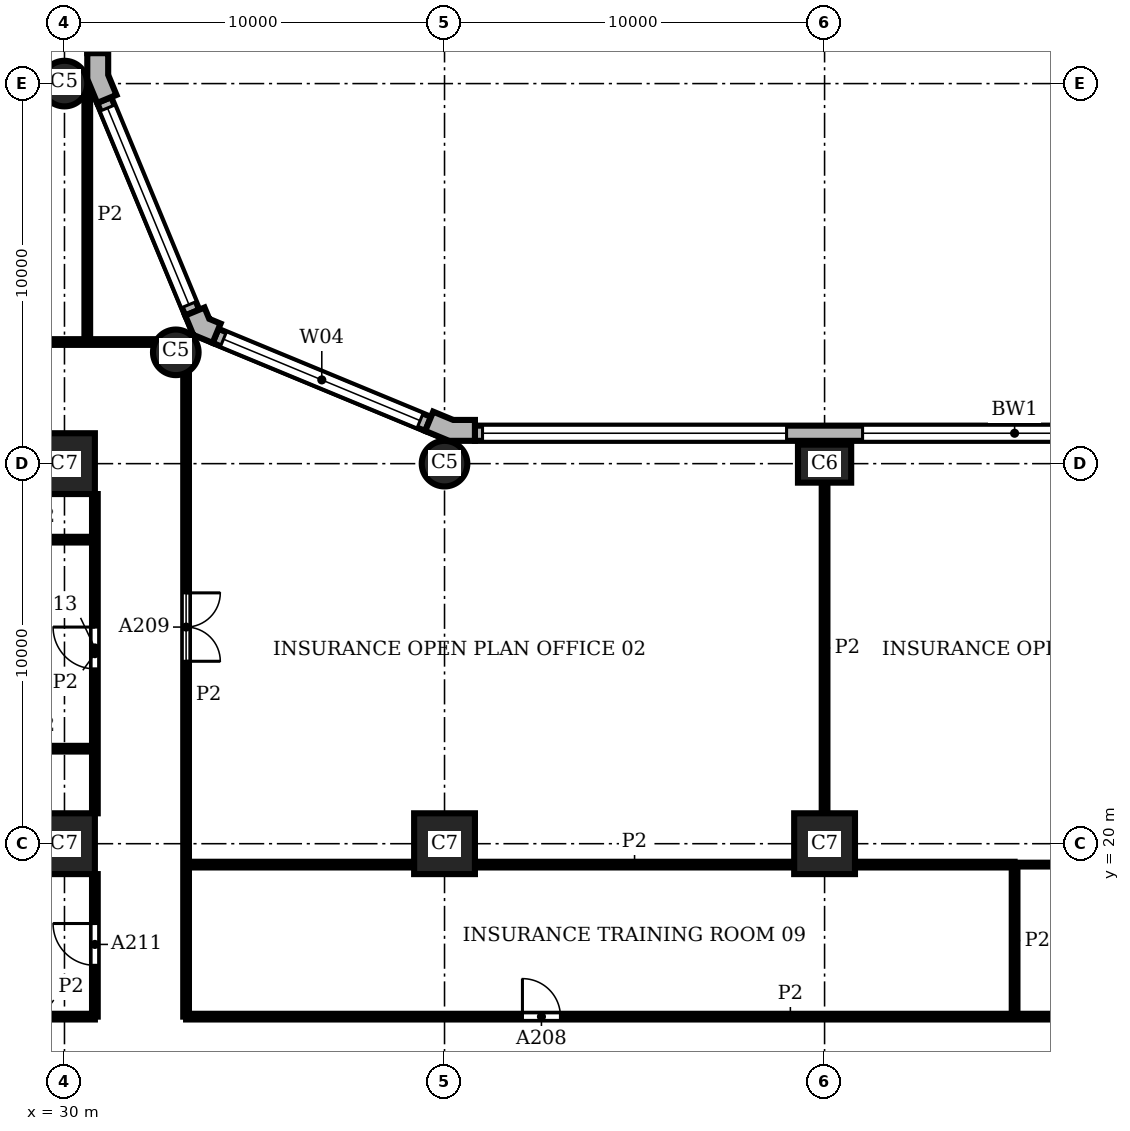
"""IFC4 building model, lengths in metres.
Left out: names, types, materials, properties, quantities, classifications, styles, units other than length and angle.
Written with IfcOpenShell. Run it as: python <this file> out.ifc"""

import sys

from ifc_helpers import new_model, si_unit, direction, frame, frame_2d, origin, origin_2d, place, context, subcontext, project, spatial, polyline, rectangle, circle, outline, extrude, element, fill, save


model = new_model("IFC4")
c1 = context("Model", 3, precision=1e-05, world=origin(), true_north=direction((0.0, 1.0)))
c2 = subcontext(c1, "Body", "Model", "MODEL_VIEW")
j1 = project(units=[si_unit("LENGTHUNIT", "METRE"), si_unit("PLANEANGLEUNIT", "RADIAN")], contexts=[c1])
p1 = place(None, origin())
s1 = spatial("IfcSite", under=j1, at=p1, CompositionType="ELEMENT")
p2 = place(p1, origin())
s2 = spatial("IfcBuilding", under=s1, at=p2, CompositionType="ELEMENT")
p3 = place(p2, frame((0.0, 0.0, 23.7)))
s3 = spatial("IfcBuildingStorey", under=s2, at=p3, CompositionType="ELEMENT", Elevation=23.7)
p4 = place(p3, frame((50.0, 30.0, 0.0), z_axis=(0.0, 0.0, 1.0), x_axis=(1.0, 0.0, 0.0)))
e1 = element("IfcColumn", 1, at=p4, inside=s3, PredefinedType="COLUMN", context=c2, shape_type="SweptSolid", body=[
    extrude(rectangle(XDim=1.4, YDim=1.0, at=origin_2d()), origin(), (0.0, 0.0, 1.0), 3.9),
])
for number, where, z_axis, x_axis in (
    (2, (40.0, 30.0, 0.0), (0.0, 0.0, 1.0), (1.0, 0.0, 0.0)),
    (3, (32.929, 32.929, 0.0), (0.0, 0.0, 1.0), (1.0, 0.0, 0.0)),
    (4, (30.0, 40.0, 0.0), (0.0, 0.0, 1.0), (1.0, 0.0, 0.0)),
):
    element("IfcColumn", number, at=place(p3, frame(where, z_axis=z_axis, x_axis=x_axis)), inside=s3, PredefinedType="COLUMN", context=c2, shape_type="SweptSolid", body=[
        extrude(circle(Radius=0.6, at=origin_2d()), origin(), (0.0, 0.0, 1.0), 3.9),
    ])
for number, where, z_axis, x_axis in (
    (5, (30.0, 20.0, 0.0), (0.0, 0.0, 1.0), (1.0, 0.0, 0.0)),
    (6, (30.0, 30.0, 0.0), (0.0, 0.0, 1.0), (1.0, 0.0, 0.0)),
    (7, (40.0, 20.0, 0.0), (0.0, 0.0, 1.0), (1.0, 0.0, 0.0)),
    (8, (50.0, 20.0, 0.0), (0.0, 0.0, 1.0), (1.0, 0.0, 0.0)),
):
    element("IfcColumn", number, at=place(p3, frame(where, z_axis=z_axis, x_axis=x_axis)), inside=s3, PredefinedType="COLUMN", context=c2, shape_type="SweptSolid", body=[
        extrude(rectangle(XDim=1.6, YDim=1.6, at=origin_2d()), origin(), (0.0, 0.0, 1.0), 3.9),
    ])
p5 = place(p3, origin())
e9 = element("IfcWall", 9, at=p5, inside=s3, PredefinedType="SOLIDWALL", context=c2, shape_type="SweptSolid", body=[
    extrude(outline(polyline([(40.8, 31.0), (40.8, 31.15), (40.229, 31.15), (39.701, 31.369), (39.644, 31.23), (39.49, 30.861), (40.119, 30.6), (40.8, 30.6), (40.8, 31.0)])), origin(), (0.0, 0.0, 1.0), 3.9),
])
e10 = element("IfcWall", 10, at=p5, inside=s3, PredefinedType="SOLIDWALL", context=c2, shape_type="SweptSolid", body=[
    extrude(outline(polyline([(34.051, 33.547), (34.108, 33.685), (33.809, 33.809), (33.685, 34.108), (33.547, 34.051), (33.177, 33.898), (33.388, 33.388), (33.898, 33.177), (34.051, 33.547)])), origin(), (0.0, 0.0, 1.0), 3.9),
])
e11 = element("IfcWall", 11, at=p5, inside=s3, PredefinedType="SOLIDWALL", context=c2, shape_type="SweptSolid", body=[
    extrude(outline(polyline([(31.23, 39.644), (31.369, 39.701), (31.15, 40.229), (31.15, 40.8), (31.0, 40.8), (30.6, 40.8), (30.6, 40.119), (30.861, 39.49), (31.23, 39.644)])), origin(), (0.0, 0.0, 1.0), 3.9),
])
p6 = place(p3, frame((69.2, 30.8, 0.0), z_axis=(0.0, 0.0, 1.0), x_axis=(-1.0, 0.0, 0.0)))
e12 = element("IfcWall", 12, at=p6, inside=s3, PredefinedType="SOLIDWALL", context=c2, shape_type="SweptSolid", body=[
    extrude(rectangle(XDim=28.4, YDim=0.4, at=frame_2d((14.2, 0.0))), origin(), (0.0, 0.0, 1.0), 3.9),
])
p7 = place(p6, frame((0.2, 0.0, 0.9)))
e13 = element("IfcOpeningElement", 13, at=p7, cuts=e12, PredefinedType="OPENING", context=c2, shape_type="SweptSolid", body=[
    extrude(rectangle(XDim=8.0, YDim=2.35, at=frame_2d((4.0, 1.175))), frame((0.0, 0.21, 0.0), z_axis=(0.0, -1.0, 0.0), x_axis=(1.0, 0.0, 0.0)), (0.0, 0.0, 1.0), 0.42),
])
p8 = place(p6, frame((10.2, 0.0, 0.9)))
e14 = element("IfcOpeningElement", 14, at=p8, cuts=e12, PredefinedType="OPENING", context=c2, shape_type="SweptSolid", body=[
    extrude(rectangle(XDim=8.0, YDim=2.35, at=frame_2d((4.0, 1.175))), frame((0.0, 0.21, 0.0), z_axis=(0.0, -1.0, 0.0), x_axis=(1.0, 0.0, 0.0)), (0.0, 0.0, 1.0), 0.42),
])
p9 = place(p6, frame((20.2, 0.0, 0.9)))
e15 = element("IfcOpeningElement", 15, at=p9, cuts=e12, PredefinedType="OPENING", context=c2, shape_type="SweptSolid", body=[
    extrude(rectangle(XDim=8.0, YDim=2.35, at=frame_2d((4.0, 1.175))), frame((0.0, 0.21, 0.0), z_axis=(0.0, -1.0, 0.0), x_axis=(1.0, 0.0, 0.0)), (0.0, 0.0, 1.0), 0.42),
])
p10 = place(p3, frame((39.567, 31.045, 0.0), z_axis=(0.0, 0.0, 1.0), x_axis=(-0.923891000409, 0.382655745237, 0.0)))
e16 = element("IfcWall", 16, at=p10, inside=s3, PredefinedType="SOLIDWALL", context=c2, shape_type="SweptSolid", body=[
    extrude(rectangle(XDim=6.053, YDim=0.4, at=frame_2d((3.027, 0.0))), origin(), (0.0, 0.0, 1.0), 3.9),
])
p11 = place(p10, frame((0.227, 0.0, 0.9)))
e17 = element("IfcOpeningElement", 17, at=p11, cuts=e16, PredefinedType="OPENING", context=c2, shape_type="SweptSolid", body=[
    extrude(rectangle(XDim=5.6, YDim=2.35, at=frame_2d((2.8, 1.175))), frame((0.0, 0.21, 0.0), z_axis=(0.0, -1.0, 0.0), x_axis=(1.0, 0.0, 0.0)), (0.0, 0.0, 1.0), 0.42),
])
p12 = place(p3, frame((33.362, 33.974, 0.0), z_axis=(0.0, 0.0, 1.0), x_axis=(-0.382655745237, 0.923891000409, 0.0)))
e18 = element("IfcWall", 18, at=p12, inside=s3, PredefinedType="SOLIDWALL", context=c2, shape_type="SweptSolid", body=[
    extrude(rectangle(XDim=6.053, YDim=0.4, at=frame_2d((3.027, 0.0))), origin(), (0.0, 0.0, 1.0), 3.9),
])
p13 = place(p12, frame((0.227, 0.0, 0.9)))
e19 = element("IfcOpeningElement", 19, at=p13, cuts=e18, PredefinedType="OPENING", context=c2, shape_type="SweptSolid", body=[
    extrude(rectangle(XDim=5.6, YDim=2.35, at=frame_2d((2.8, 1.175))), frame((0.0, 0.21, 0.0), z_axis=(0.0, -1.0, 0.0), x_axis=(1.0, 0.0, 0.0)), (0.0, 0.0, 1.0), 0.42),
])
p14 = place(p3, frame((30.8, 40.8, 0.0), z_axis=(0.0, 0.0, 1.0), x_axis=(0.0, 1.0, 0.0)))
e20 = element("IfcWall", 20, at=p14, inside=s3, PredefinedType="SOLIDWALL", context=c2, shape_type="SweptSolid", body=[
    extrude(rectangle(XDim=18.4, YDim=0.4, at=frame_2d((9.2, 0.0))), origin(), (0.0, 0.0, 1.0), 3.9),
])
p15 = place(p14, frame((0.2, 0.0, 0.9)))
e21 = element("IfcOpeningElement", 21, at=p15, cuts=e20, PredefinedType="OPENING", context=c2, shape_type="SweptSolid", body=[
    extrude(rectangle(XDim=8.0, YDim=2.35, at=frame_2d((4.0, 1.175))), frame((0.0, 0.21, 0.0), z_axis=(0.0, -1.0, 0.0), x_axis=(1.0, 0.0, 0.0)), (0.0, 0.0, 1.0), 0.42),
])
p16 = place(p14, frame((10.2, 0.0, 0.9)))
e22 = element("IfcOpeningElement", 22, at=p16, cuts=e20, PredefinedType="OPENING", context=c2, shape_type="SweptSolid", body=[
    extrude(rectangle(XDim=8.0, YDim=2.35, at=frame_2d((4.0, 1.175))), frame((0.0, 0.21, 0.0), z_axis=(0.0, -1.0, 0.0), x_axis=(1.0, 0.0, 0.0)), (0.0, 0.0, 1.0), 0.42),
])
p17 = place(p3, frame((55.0, 19.45, 0.0), z_axis=(0.0, 0.0, 1.0), x_axis=(1.0, 0.0, 0.0)))
e23 = element("IfcWall", 23, at=p17, inside=s3, PredefinedType="PARTITIONING", context=c2, shape_type="SweptSolid", body=[
    extrude(rectangle(XDim=4.2, YDim=0.1, at=frame_2d((2.1, 0.0))), origin(), (0.0, 0.0, 1.0), 3.58),
])
p18 = place(p3, frame((30.6, 33.2, 0.0), z_axis=(0.0, 0.0, 1.0), x_axis=(0.0, 1.0, 0.0)))
e24 = element("IfcWall", 24, at=p18, inside=s3, PredefinedType="PARTITIONING", context=c2, shape_type="SweptSolid", body=[
    extrude(rectangle(XDim=6.699, YDim=0.15, at=frame_2d((3.35, 0.0))), origin(), (0.0, 0.0, 1.0), 3.58),
])
p19 = place(p3, frame((30.8, 15.45, 0.0), z_axis=(0.0, 0.0, 1.0), x_axis=(0.0, 1.0, 0.0)))
e25 = element("IfcWall", 25, at=p19, inside=s3, PredefinedType="PARTITIONING", context=c2, shape_type="SweptSolid", body=[
    extrude(rectangle(XDim=3.75, YDim=0.15, at=frame_2d((1.875, 0.0))), origin(), (0.0, 0.0, 1.0), 3.58),
])
p20 = place(p19, frame((1.35, 0.0, 0.0)))
e26 = element("IfcOpeningElement", 26, at=p20, cuts=e25, PredefinedType="OPENING", context=c2, shape_type="SweptSolid", body=[
    extrude(rectangle(XDim=1.1, YDim=2.1, at=frame_2d((0.55, 1.05))), frame((0.0, 0.085, 0.0), z_axis=(0.0, -1.0, 0.0), x_axis=(1.0, 0.0, 0.0)), (0.0, 0.0, 1.0), 0.17),
])
p21 = place(p3, frame((30.8, 20.8, 0.0), z_axis=(0.0, 0.0, 1.0), x_axis=(0.0, 1.0, 0.0)))
e27 = element("IfcWall", 27, at=p21, inside=s3, PredefinedType="PARTITIONING", context=c2, shape_type="SweptSolid", body=[
    extrude(rectangle(XDim=8.4, YDim=0.15, at=frame_2d((4.2, 0.0))), origin(), (0.0, 0.0, 1.0), 3.58),
])
p22 = place(p21, frame((3.8, 0.0, 0.0)))
e28 = element("IfcOpeningElement", 28, at=p22, cuts=e27, PredefinedType="OPENING", context=c2, shape_type="SweptSolid", body=[
    extrude(rectangle(XDim=1.1, YDim=2.1, at=frame_2d((0.55, 1.05))), frame((0.0, 0.085, 0.0), z_axis=(0.0, -1.0, 0.0), x_axis=(1.0, 0.0, 0.0)), (0.0, 0.0, 1.0), 0.17),
])
p23 = place(p3, frame((33.2, 15.45, 0.0), z_axis=(0.0, 0.0, 1.0), x_axis=(0.0, 1.0, 0.0)))
e29 = element("IfcWall", 29, at=p23, inside=s3, PredefinedType="PARTITIONING", context=c2, shape_type="SweptSolid", body=[
    extrude(rectangle(XDim=16.912, YDim=0.15, at=frame_2d((8.456, 0.0))), origin(), (0.0, 0.0, 1.0), 3.58),
])
p24 = place(p23, frame((9.35, 0.0, 0.0)))
e30 = element("IfcOpeningElement", 30, at=p24, cuts=e29, PredefinedType="OPENING", context=c2, shape_type="SweptSolid", body=[
    extrude(rectangle(XDim=1.8, YDim=2.1, at=frame_2d((0.9, 1.05))), frame((0.0, 0.085, 0.0), z_axis=(0.0, -1.0, 0.0), x_axis=(1.0, 0.0, 0.0)), (0.0, 0.0, 1.0), 0.17),
])
p25 = place(p3, frame((50.0, 20.8, 0.0), z_axis=(0.0, 0.0, 1.0), x_axis=(0.0, 1.0, 0.0)))
e31 = element("IfcWall", 31, at=p25, inside=s3, PredefinedType="PARTITIONING", context=c2, shape_type="SweptSolid", body=[
    extrude(rectangle(XDim=8.7, YDim=0.15, at=frame_2d((4.35, 0.0))), origin(), (0.0, 0.0, 1.0), 3.58),
])
p26 = place(p3, frame((55.0, 15.45, 0.0), z_axis=(0.0, 0.0, 1.0), x_axis=(0.0, 1.0, 0.0)))
e32 = element("IfcWall", 32, at=p26, inside=s3, PredefinedType="PARTITIONING", context=c2, shape_type="SweptSolid", body=[
    extrude(rectangle(XDim=4.0, YDim=0.15, at=frame_2d((2.0, 0.0))), origin(), (0.0, 0.0, 1.0), 3.58),
])
p27 = place(p3, frame((28.0, 15.45, 0.0), z_axis=(0.0, 0.0, 1.0), x_axis=(1.0, 0.0, 0.0)))
e33 = element("IfcWall", 33, at=p27, inside=s3, PredefinedType="PARTITIONING", context=c2, shape_type="SweptSolid", body=[
    extrude(rectangle(XDim=2.8, YDim=0.15, at=frame_2d((1.4, 0.0))), origin(), (0.0, 0.0, 1.0), 3.58),
])
p28 = place(p3, frame((33.2, 15.45, 0.0), z_axis=(0.0, 0.0, 1.0), x_axis=(1.0, 0.0, 0.0)))
e34 = element("IfcWall", 34, at=p28, inside=s3, PredefinedType="PARTITIONING", context=c2, shape_type="SweptSolid", body=[
    extrude(rectangle(XDim=31.8, YDim=0.15, at=frame_2d((15.9, 0.0))), origin(), (0.0, 0.0, 1.0), 3.58),
])
p29 = place(p28, frame((26.4, 0.0, 0.0)))
e35 = element("IfcOpeningElement", 35, at=p29, cuts=e34, PredefinedType="OPENING", context=c2, shape_type="SweptSolid", body=[
    extrude(rectangle(XDim=1.8, YDim=2.1, at=frame_2d((0.9, 1.05))), frame((0.0, 0.085, 0.0), z_axis=(0.0, -1.0, 0.0), x_axis=(1.0, 0.0, 0.0)), (0.0, 0.0, 1.0), 0.17),
])
p30 = place(p28, frame((8.85, 0.0, 0.0)))
e36 = element("IfcOpeningElement", 36, at=p30, cuts=e34, PredefinedType="OPENING", context=c2, shape_type="SweptSolid", body=[
    extrude(rectangle(XDim=1.0, YDim=2.1, at=frame_2d((0.5, 1.05))), frame((0.0, 0.085, 0.0), z_axis=(0.0, -1.0, 0.0), x_axis=(1.0, 0.0, 0.0)), (0.0, 0.0, 1.0), 0.17),
])
p31 = place(p3, frame((33.2, 19.45, 0.0), z_axis=(0.0, 0.0, 1.0), x_axis=(1.0, 0.0, 0.0)))
e37 = element("IfcWall", 37, at=p31, inside=s3, PredefinedType="PARTITIONING", context=c2, shape_type="SweptSolid", body=[
    extrude(rectangle(XDim=6.0, YDim=0.15, at=frame_2d((3.0, 0.0))), origin(), (0.0, 0.0, 1.0), 3.58),
])
p32 = place(p3, frame((40.8, 19.45, 0.0), z_axis=(0.0, 0.0, 1.0), x_axis=(1.0, 0.0, 0.0)))
e38 = element("IfcWall", 38, at=p32, inside=s3, PredefinedType="PARTITIONING", context=c2, shape_type="SweptSolid", body=[
    extrude(rectangle(XDim=8.4, YDim=0.15, at=frame_2d((4.2, 0.0))), origin(), (0.0, 0.0, 1.0), 3.58),
])
p33 = place(p3, frame((50.8, 19.45, 0.0), z_axis=(0.0, 0.0, 1.0), x_axis=(1.0, 0.0, 0.0)))
e39 = element("IfcWall", 39, at=p33, inside=s3, PredefinedType="PARTITIONING", context=c2, shape_type="SweptSolid", body=[
    extrude(rectangle(XDim=4.2, YDim=0.15, at=frame_2d((2.1, 0.0))), origin(), (0.0, 0.0, 1.0), 3.58),
])
for number, where, z_axis, x_axis in (
    (40, (28.0, 22.5, 0.0), (0.0, 0.0, 1.0), (1.0, 0.0, 0.0)),
    (41, (28.0, 28.0, 0.0), (0.0, 0.0, 1.0), (1.0, 0.0, 0.0)),
):
    element("IfcWall", number, at=place(p3, frame(where, z_axis=z_axis, x_axis=x_axis)), inside=s3, PredefinedType="PARTITIONING", context=c2, shape_type="SweptSolid", body=[
        extrude(rectangle(XDim=2.8, YDim=0.15, at=frame_2d((1.4, 0.0))), origin(), (0.0, 0.0, 1.0), 3.58),
    ])
p34 = place(p3, frame((16.5, 33.2, 0.0), z_axis=(0.0, 0.0, 1.0), x_axis=(1.0, 0.0, 0.0)))
e42 = element("IfcWall", 42, at=p34, inside=s3, PredefinedType="PARTITIONING", context=c2, shape_type="SweptSolid", body=[
    extrude(rectangle(XDim=15.862, YDim=0.15, at=frame_2d((7.931, 0.0))), origin(), (0.0, 0.0, 1.0), 3.58),
])
p35 = place(p34, frame((6.1, 0.0, 0.0)))
e43 = element("IfcOpeningElement", 43, at=p35, cuts=e42, PredefinedType="OPENING", context=c2, shape_type="SweptSolid", body=[
    extrude(rectangle(XDim=1.8, YDim=2.1, at=frame_2d((0.9, 1.05))), frame((0.0, 0.085, 0.0), z_axis=(0.0, -1.0, 0.0), x_axis=(1.0, 0.0, 0.0)), (0.0, 0.0, 1.0), 0.17),
])
p36 = place(p8, origin())
e44 = element("IfcWindow", 44, at=p36, inside=s3, PartitioningType="SINGLE_PANEL", PredefinedType="WINDOW", context=c2, shape_type="SweptSolid", body=[
    extrude(rectangle(XDim=8.0, YDim=2.35, at=frame_2d((4.0, 1.175))), frame((0.0, 0.16, 0.0), z_axis=(0.0, -1.0, 0.0), x_axis=(1.0, 0.0, 0.0)), (0.0, 0.0, 1.0), 0.06),
])
fill(e14, e44)
p37 = place(p9, origin())
e45 = element("IfcWindow", 45, at=p37, inside=s3, PartitioningType="SINGLE_PANEL", PredefinedType="WINDOW", context=c2, shape_type="SweptSolid", body=[
    extrude(rectangle(XDim=8.0, YDim=2.35, at=frame_2d((4.0, 1.175))), frame((0.0, 0.16, 0.0), z_axis=(0.0, -1.0, 0.0), x_axis=(1.0, 0.0, 0.0)), (0.0, 0.0, 1.0), 0.06),
])
fill(e15, e45)
p38 = place(p11, origin())
e46 = element("IfcWindow", 46, at=p38, inside=s3, PartitioningType="SINGLE_PANEL", PredefinedType="WINDOW", context=c2, shape_type="SweptSolid", body=[
    extrude(rectangle(XDim=5.6, YDim=2.35, at=frame_2d((2.8, 1.175))), frame((0.0, 0.16, 0.0), z_axis=(0.0, -1.0, 0.0), x_axis=(1.0, 0.0, 0.0)), (0.0, 0.0, 1.0), 0.06),
])
fill(e17, e46)
p39 = place(p13, origin())
e47 = element("IfcWindow", 47, at=p39, inside=s3, PartitioningType="SINGLE_PANEL", PredefinedType="WINDOW", context=c2, shape_type="SweptSolid", body=[
    extrude(rectangle(XDim=5.6, YDim=2.35, at=frame_2d((2.8, 1.175))), frame((0.0, 0.16, 0.0), z_axis=(0.0, -1.0, 0.0), x_axis=(1.0, 0.0, 0.0)), (0.0, 0.0, 1.0), 0.06),
])
fill(e19, e47)
p40 = place(p30, origin())
e48 = element("IfcDoor", 48, at=p40, inside=s3, OperationType="SINGLE_SWING_LEFT", PredefinedType="DOOR", context=c2, shape_type="SweptSolid", body=[
    extrude(rectangle(XDim=1.0, YDim=2.1, at=frame_2d((0.5, 1.05))), frame((0.0, 0.025, 0.0), z_axis=(0.0, -1.0, 0.0), x_axis=(1.0, 0.0, 0.0)), (0.0, 0.0, 1.0), 0.05),
])
fill(e36, e48)
p41 = place(p24, frame((1.8, 0.0, 0.0), z_axis=(0.0, 0.0, 1.0), x_axis=(-1.0, 0.0, 0.0)))
e49 = element("IfcDoor", 49, at=p41, inside=s3, OperationType="DOUBLE_DOOR_SINGLE_SWING", PredefinedType="DOOR", context=c2, shape_type="SweptSolid", body=[
    extrude(rectangle(XDim=1.8, YDim=2.1, at=frame_2d((0.9, 1.05))), frame((0.0, 0.025, 0.0), z_axis=(0.0, -1.0, 0.0), x_axis=(1.0, 0.0, 0.0)), (0.0, 0.0, 1.0), 0.05),
])
fill(e30, e49)
p42 = place(p20, origin())
e50 = element("IfcDoor", 50, at=p42, inside=s3, OperationType="SINGLE_SWING_RIGHT", PredefinedType="DOOR", context=c2, shape_type="SweptSolid", body=[
    extrude(rectangle(XDim=1.1, YDim=2.1, at=frame_2d((0.55, 1.05))), frame((0.0, 0.025, 0.0), z_axis=(0.0, -1.0, 0.0), x_axis=(1.0, 0.0, 0.0)), (0.0, 0.0, 1.0), 0.05),
])
fill(e26, e50)
p43 = place(p22, origin())
e51 = element("IfcDoor", 51, at=p43, inside=s3, OperationType="SINGLE_SWING_RIGHT", PredefinedType="DOOR", context=c2, shape_type="SweptSolid", body=[
    extrude(rectangle(XDim=1.1, YDim=2.1, at=frame_2d((0.55, 1.05))), frame((0.0, 0.025, 0.0), z_axis=(0.0, -1.0, 0.0), x_axis=(1.0, 0.0, 0.0)), (0.0, 0.0, 1.0), 0.05),
])
fill(e28, e51)
save(model, sys.argv[1])
